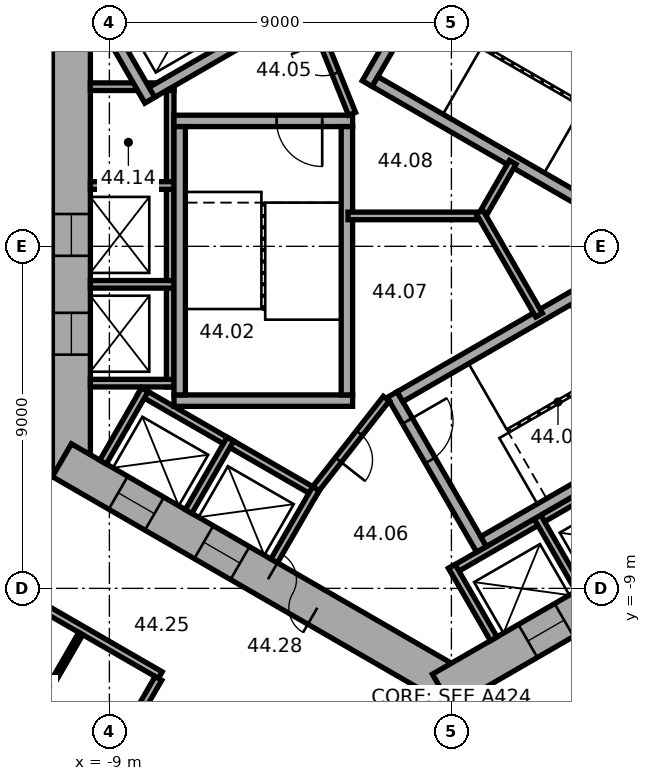
"""IFC4 building model, lengths in metres.
Left out: names, types, materials, properties, quantities, classifications, styles, units other than length and angle.
Written with IfcOpenShell. Run it as: python <this file> out.ifc"""

import sys

from ifc_helpers import new_model, si_unit, direction, frame, frame_2d, origin, place, context, subcontext, project, spatial, rectangle, extrude, element, fill, save


model = new_model("IFC4")
c1 = context("Model", 3, precision=1e-05, world=origin(), true_north=direction((0.0, 1.0)))
c2 = subcontext(c1, "Body", "Model", "MODEL_VIEW")
j1 = project(units=[si_unit("LENGTHUNIT", "METRE"), si_unit("PLANEANGLEUNIT", "RADIAN")], contexts=[c1])
p1 = place(None, origin())
s1 = spatial("IfcSite", under=j1, at=p1, CompositionType="ELEMENT")
p2 = place(p1, origin())
s2 = spatial("IfcBuilding", under=s1, at=p2, CompositionType="ELEMENT")
p3 = place(p2, frame((0.0, 0.0, 179.9)))
s3 = spatial("IfcBuildingStorey", under=s2, at=p3, CompositionType="ELEMENT", Elevation=179.9)
p4 = place(p3, frame((-10.0, 6.062, 0.0), z_axis=(0.0, 0.0, 1.0), x_axis=(0.0, -1.0, 0.0)))
e1 = element("IfcWall", 1, at=p4, inside=s3, PredefinedType="SHEAR", context=c2, shape_type="SweptSolid", body=[
    extrude(rectangle(XDim=12.125, YDim=1.0, at=frame_2d((6.062, 0.0))), origin(), (0.0, 0.0, 1.0), 3.7),
])
p5 = place(p4, frame((5.212, 0.0, 0.0)))
e2 = element("IfcOpeningElement", 2, at=p5, cuts=e1, PredefinedType="OPENING", context=c2, shape_type="SweptSolid", body=[
    extrude(rectangle(XDim=1.1, YDim=2.1, at=frame_2d((0.55, 1.05))), frame((0.0, 0.51, 0.0), z_axis=(0.0, -1.0, 0.0), x_axis=(1.0, 0.0, 0.0)), (0.0, 0.0, 1.0), 1.02),
])
p6 = place(p4, frame((7.812, 0.0, 0.0)))
e3 = element("IfcOpeningElement", 3, at=p6, cuts=e1, PredefinedType="OPENING", context=c2, shape_type="SweptSolid", body=[
    extrude(rectangle(XDim=1.1, YDim=2.1, at=frame_2d((0.55, 1.05))), frame((0.0, 0.51, 0.0), z_axis=(0.0, -1.0, 0.0), x_axis=(1.0, 0.0, 0.0)), (0.0, 0.0, 1.0), 1.02),
])
p7 = place(p3, frame((-10.25, -5.629, 0.0), z_axis=(0.0, 0.0, 1.0), x_axis=(0.866022616891, -0.50000482701, 0.0)))
e4 = element("IfcWall", 4, at=p7, inside=s3, PredefinedType="SHEAR", context=c2, shape_type="SweptSolid", body=[
    extrude(rectangle(XDim=12.125, YDim=1.0, at=frame_2d((6.062, 0.0))), origin(), (0.0, 0.0, 1.0), 3.7),
])
p8 = place(p7, frame((6.262, 0.0, 0.0)))
e5 = element("IfcOpeningElement", 5, at=p8, cuts=e4, PredefinedType="OPENING", context=c2, shape_type="SweptSolid", body=[
    extrude(rectangle(XDim=1.5, YDim=2.1, at=frame_2d((0.75, 1.05))), frame((0.0, 0.51, 0.0), z_axis=(0.0, -1.0, 0.0), x_axis=(1.0, 0.0, 0.0)), (0.0, 0.0, 1.0), 1.02),
])
p9 = place(p7, frame((1.712, 0.0, 0.0)))
e6 = element("IfcOpeningElement", 6, at=p9, cuts=e4, PredefinedType="OPENING", context=c2, shape_type="SweptSolid", body=[
    extrude(rectangle(XDim=1.1, YDim=2.1, at=frame_2d((0.55, 1.05))), frame((0.0, 0.51, 0.0), z_axis=(0.0, -1.0, 0.0), x_axis=(1.0, 0.0, 0.0)), (0.0, 0.0, 1.0), 1.02),
])
p10 = place(p7, frame((4.312, 0.0, 0.0)))
e7 = element("IfcOpeningElement", 7, at=p10, cuts=e4, PredefinedType="OPENING", context=c2, shape_type="SweptSolid", body=[
    extrude(rectangle(XDim=1.1, YDim=2.1, at=frame_2d((0.55, 1.05))), frame((0.0, 0.51, 0.0), z_axis=(0.0, -1.0, 0.0), x_axis=(1.0, 0.0, 0.0)), (0.0, 0.0, 1.0), 1.02),
])
p11 = place(p3, frame((-0.25, -11.691, 0.0), z_axis=(0.0, 0.0, 1.0), x_axis=(0.866022616891, 0.50000482701, 0.0)))
e8 = element("IfcWall", 8, at=p11, inside=s3, PredefinedType="SHEAR", context=c2, shape_type="SweptSolid", body=[
    extrude(rectangle(XDim=12.125, YDim=1.0, at=frame_2d((6.062, 0.0))), origin(), (0.0, 0.0, 1.0), 3.7),
])
p12 = place(p11, frame((2.612, 0.0, 0.0)))
e9 = element("IfcOpeningElement", 9, at=p12, cuts=e8, PredefinedType="OPENING", context=c2, shape_type="SweptSolid", body=[
    extrude(rectangle(XDim=1.1, YDim=2.1, at=frame_2d((0.55, 1.05))), frame((0.0, 0.51, 0.0), z_axis=(0.0, -1.0, 0.0), x_axis=(1.0, 0.0, 0.0)), (0.0, 0.0, 1.0), 1.02),
])
p13 = place(p11, frame((5.212, 0.0, 0.0)))
e10 = element("IfcOpeningElement", 10, at=p13, cuts=e8, PredefinedType="OPENING", context=c2, shape_type="SweptSolid", body=[
    extrude(rectangle(XDim=1.1, YDim=2.1, at=frame_2d((0.55, 1.05))), frame((0.0, 0.51, 0.0), z_axis=(0.0, -1.0, 0.0), x_axis=(1.0, 0.0, 0.0)), (0.0, 0.0, 1.0), 1.02),
])
p14 = place(p11, frame((7.812, 0.0, 0.0)))
e11 = element("IfcOpeningElement", 11, at=p14, cuts=e8, PredefinedType="OPENING", context=c2, shape_type="SweptSolid", body=[
    extrude(rectangle(XDim=1.1, YDim=2.1, at=frame_2d((0.55, 1.05))), frame((0.0, 0.51, 0.0), z_axis=(0.0, -1.0, 0.0), x_axis=(1.0, 0.0, 0.0)), (0.0, 0.0, 1.0), 1.02),
])
for number, where, z_axis, x_axis in (
    (12, (7.424, 4.259, 0.0), (0.0, 0.0, 1.0), (-0.866, 0.5, 0.0)),
    (13, (-7.4, 4.3, 0.0), (0.0, 0.0, 1.0), (0.0, -1.0, 0.0)),
):
    element("IfcWall", number, at=place(p3, frame(where, z_axis=z_axis, x_axis=x_axis)), inside=s3, PredefinedType="PARTITIONING", context=c2, shape_type="SweptSolid", body=[
        extrude(rectangle(XDim=8.0, YDim=0.2, at=frame_2d((4.0, 0.0))), origin(), (0.0, 0.0, 1.0), 3.42),
    ])
for number, where, z_axis, x_axis in (
    (14, (-7.3, 4.2, 0.0), (0.0, 0.0, 1.0), (-1.0, 0.0, 0.0)),
    (15, (-7.3, 1.6, 0.0), (0.0, 0.0, 1.0), (-1.0, 0.0, 0.0)),
    (16, (-7.3, -1.0, 0.0), (0.0, 0.0, 1.0), (-1.0, 0.0, 0.0)),
    (17, (-7.3, -3.6, 0.0), (0.0, 0.0, 1.0), (-1.0, 0.0, 0.0)),
):
    element("IfcWall", number, at=place(p3, frame(where, z_axis=z_axis, x_axis=x_axis)), inside=s3, PredefinedType="PARTITIONING", context=c2, shape_type="SweptSolid", body=[
        extrude(rectangle(XDim=2.2, YDim=0.2, at=frame_2d((1.1, 0.0))), origin(), (0.0, 0.0, 1.0), 3.42),
    ])
p15 = place(p3, frame((-8.203, -3.809, 0.0), z_axis=(0.0, 0.0, 1.0), x_axis=(0.866028230842, -0.499995103361, 0.0)))
e18 = element("IfcWall", 18, at=p15, inside=s3, PredefinedType="PARTITIONING", context=c2, shape_type="SweptSolid", body=[
    extrude(rectangle(XDim=5.4, YDim=0.2, at=frame_2d((2.7, 0.0))), origin(), (0.0, 0.0, 1.0), 3.42),
])
for number, where, z_axis, x_axis in (
    (19, (-8.067, -3.772, 0.0), (0.0, 0.0, 1.0), (-0.5, -0.866, 0.0)),
    (20, (-5.815, -5.072, 0.0), (0.0, 0.0, 1.0), (-0.5, -0.866, 0.0)),
):
    element("IfcWall", number, at=place(p3, frame(where, z_axis=z_axis, x_axis=x_axis)), inside=s3, PredefinedType="PARTITIONING", context=c2, shape_type="SweptSolid", body=[
        extrude(rectangle(XDim=2.2, YDim=0.2, at=frame_2d((1.1, 0.0))), origin(), (0.0, 0.0, 1.0), 3.42),
    ])
p16 = place(p3, frame((-3.563, -6.372, 0.0), z_axis=(0.0, 0.0, 1.0), x_axis=(-0.499994660107, -0.866028486751, 0.0)))
e21 = element("IfcWall", 21, at=p16, inside=s3, PredefinedType="PARTITIONING", context=c2, shape_type="SweptSolid", body=[
    extrude(rectangle(XDim=2.2, YDim=0.2, at=frame_2d((1.1, 0.0))), origin(), (0.0, 0.0, 1.0), 3.42),
])
p17 = place(p3, frame((-0.024, -8.559, 0.0), z_axis=(0.0, 0.0, 1.0), x_axis=(0.866026010844, 0.49999894854, 0.0)))
e22 = element("IfcWall", 22, at=p17, inside=s3, PredefinedType="PARTITIONING", context=c2, shape_type="SweptSolid", body=[
    extrude(rectangle(XDim=8.0, YDim=0.2, at=frame_2d((4.0, 0.0))), origin(), (0.0, 0.0, 1.0), 3.42),
])
for number, where, z_axis, x_axis in (
    (23, (0.013, -8.422, 0.0), (0.0, 0.0, 1.0), (0.5, -0.866, 0.0)),
    (24, (2.264, -7.122, 0.0), (0.0, 0.0, 1.0), (0.5, -0.866, 0.0)),
):
    element("IfcWall", number, at=place(p3, frame(where, z_axis=z_axis, x_axis=x_axis)), inside=s3, PredefinedType="PARTITIONING", context=c2, shape_type="SweptSolid", body=[
        extrude(rectangle(XDim=2.2, YDim=0.2, at=frame_2d((1.1, 0.0))), origin(), (0.0, 0.0, 1.0), 3.42),
    ])
p18 = place(p3, frame((-2.216, 4.282, 0.0), z_axis=(0.0, 0.0, 1.0), x_axis=(0.499977259774, 0.866038532462, 0.0)))
e25 = element("IfcWall", 25, at=p18, inside=s3, PredefinedType="SHEAR", context=c2, shape_type="SweptSolid", body=[
    extrude(rectangle(XDim=4.7, YDim=0.3, at=frame_2d((2.35, 0.0))), origin(), (0.0, 0.0, 1.0), 3.42),
])
for number, where, z_axis, x_axis in (
    (26, (4.103, 0.807, 0.0), (0.0, 0.0, 1.0), (-0.866, 0.5, 0.0)),
    (27, (6.303, 4.617, 0.0), (0.0, 0.0, 1.0), (-0.866, 0.5, 0.0)),
):
    element("IfcWall", number, at=place(p3, frame(where, z_axis=z_axis, x_axis=x_axis)), inside=s3, PredefinedType="SHEAR", context=c2, shape_type="SweptSolid", body=[
        extrude(rectangle(XDim=7.06, YDim=0.3, at=frame_2d((3.53, 0.0))), origin(), (0.0, 0.0, 1.0), 3.42),
    ])
p19 = place(p3, frame((-2.6, 3.3, 0.0), z_axis=(0.0, 0.0, 1.0), x_axis=(-1.0, 0.0, 0.0)))
e28 = element("IfcWall", 28, at=p19, inside=s3, PredefinedType="SHEAR", context=c2, shape_type="SweptSolid", body=[
    extrude(rectangle(XDim=4.7, YDim=0.3, at=frame_2d((2.35, 0.0))), origin(), (0.0, 0.0, 1.0), 3.42),
])
p20 = place(p19, frame((0.8, 0.0, 0.0)))
e29 = element("IfcOpeningElement", 29, at=p20, cuts=e28, PredefinedType="OPENING", context=c2, shape_type="SweptSolid", body=[
    extrude(rectangle(XDim=1.2, YDim=2.1, at=frame_2d((0.6, 1.05))), frame((0.0, 0.16, 0.0), z_axis=(0.0, -1.0, 0.0), x_axis=(1.0, 0.0, 0.0)), (0.0, 0.0, 1.0), 0.32),
])
p21 = place(p3, frame((-2.6, -4.06, 0.0), z_axis=(0.0, 0.0, 1.0), x_axis=(-1.0, 0.0, 0.0)))
e30 = element("IfcWall", 30, at=p21, inside=s3, PredefinedType="SHEAR", context=c2, shape_type="SweptSolid", body=[
    extrude(rectangle(XDim=4.7, YDim=0.3, at=frame_2d((2.35, 0.0))), origin(), (0.0, 0.0, 1.0), 3.42),
])
for number, where, z_axis, x_axis in (
    (31, (-2.75, 3.15, 0.0), (0.0, 0.0, 1.0), (0.0, -1.0, 0.0)),
    (32, (-7.15, 3.15, 0.0), (0.0, 0.0, 1.0), (0.0, -1.0, 0.0)),
):
    element("IfcWall", number, at=place(p3, frame(where, z_axis=z_axis, x_axis=x_axis)), inside=s3, PredefinedType="SHEAR", context=c2, shape_type="SweptSolid", body=[
        extrude(rectangle(XDim=7.06, YDim=0.3, at=frame_2d((3.53, 0.0))), origin(), (0.0, 0.0, 1.0), 3.42),
    ])
p22 = place(p3, frame((-1.558, -3.902, 0.0), z_axis=(0.0, 0.0, 1.0), x_axis=(0.499977259774, -0.866038532462, 0.0)))
e33 = element("IfcWall", 33, at=p22, inside=s3, PredefinedType="SHEAR", context=c2, shape_type="SweptSolid", body=[
    extrude(rectangle(XDim=4.7, YDim=0.3, at=frame_2d((2.35, 0.0))), origin(), (0.0, 0.0, 1.0), 3.42),
])
p23 = place(p22, frame((0.8, 0.0, 0.0)))
e34 = element("IfcOpeningElement", 34, at=p23, cuts=e33, PredefinedType="OPENING", context=c2, shape_type="SweptSolid", body=[
    extrude(rectangle(XDim=1.2, YDim=2.1, at=frame_2d((0.6, 1.05))), frame((0.0, 0.16, 0.0), z_axis=(0.0, -1.0, 0.0), x_axis=(1.0, 0.0, 0.0)), (0.0, 0.0, 1.0), 0.32),
])
for number, where, z_axis, x_axis in (
    (35, (-1.353, -3.957, 0.0), (0.0, 0.0, 1.0), (0.866, 0.5, 0.0)),
    (36, (0.847, -7.767, 0.0), (0.0, 0.0, 1.0), (0.866, 0.5, 0.0)),
):
    element("IfcWall", number, at=place(p3, frame(where, z_axis=z_axis, x_axis=x_axis)), inside=s3, PredefinedType="SHEAR", context=c2, shape_type="SweptSolid", body=[
        extrude(rectangle(XDim=7.06, YDim=0.3, at=frame_2d((3.53, 0.0))), origin(), (0.0, 0.0, 1.0), 3.42),
    ])
p24 = place(p3, frame((-5.24, 5.577, 0.0), z_axis=(0.0, 0.0, 1.0), x_axis=(-0.866014461049, -0.500018952895, 0.0)))
e37 = element("IfcWall", 37, at=p24, inside=s3, PredefinedType="SHEAR", context=c2, shape_type="SweptSolid", body=[
    extrude(rectangle(XDim=3.35, YDim=0.3, at=frame_2d((1.675, 0.0))), origin(), (0.0, 0.0, 1.0), 3.42),
])
p25 = place(p3, frame((-7.937, 3.847, 0.0), z_axis=(0.0, 0.0, 1.0), x_axis=(-0.50002983664, 0.866008176907, 0.0)))
e38 = element("IfcWall", 38, at=p25, inside=s3, PredefinedType="SHEAR", context=c2, shape_type="SweptSolid", body=[
    extrude(rectangle(XDim=2.2, YDim=0.3, at=frame_2d((1.1, 0.0))), origin(), (0.0, 0.0, 1.0), 3.42),
])
p26 = place(p3, frame((-2.615, 3.487, 0.0), z_axis=(0.0, 0.0, 1.0), x_axis=(-0.373576831041, 0.92759924068, 0.0)))
e39 = element("IfcWall", 39, at=p26, inside=s3, PredefinedType="PARTITIONING", context=c2, shape_type="SweptSolid", body=[
    extrude(rectangle(XDim=3.002, YDim=0.2, at=frame_2d((1.501, 0.0))), origin(), (0.0, 0.0, 1.0), 3.42),
])
p27 = place(p26, frame((1.15, 0.0, 0.0)))
e40 = element("IfcOpeningElement", 40, at=p27, cuts=e39, PredefinedType="OPENING", context=c2, shape_type="SweptSolid", body=[
    extrude(rectangle(XDim=0.9, YDim=2.1, at=frame_2d((0.45, 1.05))), frame((0.0, 0.11, 0.0), z_axis=(0.0, -1.0, 0.0), x_axis=(1.0, 0.0, 0.0)), (0.0, 0.0, 1.0), 0.22),
])
p28 = place(p3, frame((-1.712, -4.008, 0.0), z_axis=(0.0, 0.0, 1.0), x_axis=(-0.616549420702, -0.787316208287, 0.0)))
e41 = element("IfcWall", 41, at=p28, inside=s3, PredefinedType="PARTITIONING", context=c2, shape_type="SweptSolid", body=[
    extrude(rectangle(XDim=3.002, YDim=0.2, at=frame_2d((1.501, 0.0))), origin(), (0.0, 0.0, 1.0), 3.42),
])
p29 = place(p28, frame((1.15, 0.0, 0.0)))
e42 = element("IfcOpeningElement", 42, at=p29, cuts=e41, PredefinedType="OPENING", context=c2, shape_type="SweptSolid", body=[
    extrude(rectangle(XDim=0.9, YDim=2.1, at=frame_2d((0.45, 1.05))), frame((0.0, 0.11, 0.0), z_axis=(0.0, -1.0, 0.0), x_axis=(1.0, 0.0, 0.0)), (0.0, 0.0, 1.0), 0.22),
])
p30 = place(p3, frame((0.92, 0.8, 0.0), z_axis=(0.0, 0.0, 1.0), x_axis=(-1.0, 0.0, 0.0)))
e43 = element("IfcWall", 43, at=p30, inside=s3, PredefinedType="PARTITIONING", context=c2, shape_type="SweptSolid", body=[
    extrude(rectangle(XDim=3.64, YDim=0.2, at=frame_2d((1.82, 0.0))), origin(), (0.0, 0.0, 1.0), 3.42),
])
p31 = place(p3, frame((0.74, 0.696, 0.0), z_axis=(0.0, 0.0, 1.0), x_axis=(0.499956301907, 0.86605063142, 0.0)))
e44 = element("IfcWall", 44, at=p31, inside=s3, PredefinedType="PARTITIONING", context=c2, shape_type="SweptSolid", body=[
    extrude(rectangle(XDim=1.747, YDim=0.2, at=frame_2d((0.874, 0.0))), origin(), (0.0, 0.0, 1.0), 3.42),
])
p32 = place(p3, frame((0.74, 0.904, 0.0), z_axis=(0.0, 0.0, 1.0), x_axis=(0.500028278809, -0.866009076391, 0.0)))
e45 = element("IfcWall", 45, at=p32, inside=s3, PredefinedType="PARTITIONING", context=c2, shape_type="SweptSolid", body=[
    extrude(rectangle(XDim=3.133, YDim=0.2, at=frame_2d((1.566, 0.0))), origin(), (0.0, 0.0, 1.0), 3.42),
])
p33 = place(p3, frame((-11.435, -9.103, 0.0), z_axis=(0.0, 0.0, 1.0), x_axis=(0.866007399799, -0.500031182522, 0.0)))
e46 = element("IfcWall", 46, at=p33, inside=s3, PredefinedType="PARTITIONING", context=c2, shape_type="SweptSolid", body=[
    extrude(rectangle(XDim=4.358, YDim=0.2, at=frame_2d((2.179, 0.0))), origin(), (0.0, 0.0, 1.0), 3.42),
])
p34 = place(p3, frame((-11.235, -17.474, 0.0), z_axis=(0.0, 0.0, 1.0), x_axis=(0.500009260695, 0.866020057054, 0.0)))
e47 = element("IfcWall", 47, at=p34, inside=s3, PredefinedType="PARTITIONING", context=c2, shape_type="SweptSolid", body=[
    extrude(rectangle(XDim=7.049, YDim=0.2, at=frame_2d((3.524, 0.0))), origin(), (0.0, 0.0, 1.0), 2.87),
])
p35 = place(p34, frame((3.024, 0.0, 0.0)))
e48 = element("IfcOpeningElement", 48, at=p35, cuts=e47, PredefinedType="OPENING", context=c2, shape_type="SweptSolid", body=[
    extrude(rectangle(XDim=1.0, YDim=2.1, at=frame_2d((0.5, 1.05))), frame((0.0, 0.11, 0.0), z_axis=(0.0, -1.0, 0.0), x_axis=(1.0, 0.0, 0.0)), (0.0, 0.0, 1.0), 0.22),
])
p36 = place(p3, frame((-9.753, -10.19, 0.0), z_axis=(0.0, 0.0, 1.0), x_axis=(-0.49994888933, -0.866054910533, 0.0)))
e49 = element("IfcWall", 49, at=p36, inside=s3, PredefinedType="PARTITIONING", context=c2, shape_type="SweptSolid", body=[
    extrude(rectangle(XDim=2.24, YDim=0.12, at=frame_2d((1.12, 0.0))), origin(), (0.0, 0.0, 1.0), 3.42),
])
p37 = place(p8, origin())
e50 = element("IfcDoor", 50, at=p37, inside=s3, OperationType="DOUBLE_DOOR_SINGLE_SWING", PredefinedType="DOOR", context=c2, shape_type="SweptSolid", body=[
    extrude(rectangle(XDim=1.5, YDim=2.1, at=frame_2d((0.75, 1.05))), frame((0.0, 0.025, 0.0), z_axis=(0.0, -1.0, 0.0), x_axis=(1.0, 0.0, 0.0)), (0.0, 0.0, 1.0), 0.05),
])
fill(e5, e50)
p38 = place(p20, origin())
e51 = element("IfcDoor", 51, at=p38, inside=s3, OperationType="SINGLE_SWING_RIGHT", PredefinedType="DOOR", context=c2, shape_type="SweptSolid", body=[
    extrude(rectangle(XDim=1.2, YDim=2.1, at=frame_2d((0.6, 1.05))), frame((0.0, 0.025, 0.0), z_axis=(0.0, -1.0, 0.0), x_axis=(1.0, 0.0, 0.0)), (0.0, 0.0, 1.0), 0.05),
])
fill(e29, e51)
p39 = place(p23, origin())
e52 = element("IfcDoor", 52, at=p39, inside=s3, OperationType="SINGLE_SWING_RIGHT", PredefinedType="DOOR", context=c2, shape_type="SweptSolid", body=[
    extrude(rectangle(XDim=1.2, YDim=2.1, at=frame_2d((0.6, 1.05))), frame((0.0, 0.025, 0.0), z_axis=(0.0, -1.0, 0.0), x_axis=(1.0, 0.0, 0.0)), (0.0, 0.0, 1.0), 0.05),
])
fill(e34, e52)
p40 = place(p27, origin())
e53 = element("IfcDoor", 53, at=p40, inside=s3, OperationType="SINGLE_SWING_LEFT", PredefinedType="DOOR", context=c2, shape_type="SweptSolid", body=[
    extrude(rectangle(XDim=0.9, YDim=2.1, at=frame_2d((0.45, 1.05))), frame((0.0, 0.025, 0.0), z_axis=(0.0, -1.0, 0.0), x_axis=(1.0, 0.0, 0.0)), (0.0, 0.0, 1.0), 0.05),
])
fill(e40, e53)
p41 = place(p29, origin())
e54 = element("IfcDoor", 54, at=p41, inside=s3, OperationType="SINGLE_SWING_LEFT", PredefinedType="DOOR", context=c2, shape_type="SweptSolid", body=[
    extrude(rectangle(XDim=0.9, YDim=2.1, at=frame_2d((0.45, 1.05))), frame((0.0, 0.025, 0.0), z_axis=(0.0, -1.0, 0.0), x_axis=(1.0, 0.0, 0.0)), (0.0, 0.0, 1.0), 0.05),
])
fill(e42, e54)
p42 = place(p5, origin())
e55 = element("IfcDoor", 55, at=p42, inside=s3, OperationType="DOUBLE_DOOR_SLIDING", PredefinedType="DOOR", context=c2, shape_type="SweptSolid", body=[
    extrude(rectangle(XDim=1.1, YDim=2.1, at=frame_2d((0.55, 1.05))), frame((0.0, 0.025, 0.0), z_axis=(0.0, -1.0, 0.0), x_axis=(1.0, 0.0, 0.0)), (0.0, 0.0, 1.0), 0.05),
])
fill(e2, e55)
p43 = place(p6, origin())
e56 = element("IfcDoor", 56, at=p43, inside=s3, OperationType="DOUBLE_DOOR_SLIDING", PredefinedType="DOOR", context=c2, shape_type="SweptSolid", body=[
    extrude(rectangle(XDim=1.1, YDim=2.1, at=frame_2d((0.55, 1.05))), frame((0.0, 0.025, 0.0), z_axis=(0.0, -1.0, 0.0), x_axis=(1.0, 0.0, 0.0)), (0.0, 0.0, 1.0), 0.05),
])
fill(e3, e56)
p44 = place(p9, origin())
e57 = element("IfcDoor", 57, at=p44, inside=s3, OperationType="DOUBLE_DOOR_SLIDING", PredefinedType="DOOR", context=c2, shape_type="SweptSolid", body=[
    extrude(rectangle(XDim=1.1, YDim=2.1, at=frame_2d((0.55, 1.05))), frame((0.0, 0.025, 0.0), z_axis=(0.0, -1.0, 0.0), x_axis=(1.0, 0.0, 0.0)), (0.0, 0.0, 1.0), 0.05),
])
fill(e6, e57)
p45 = place(p10, origin())
e58 = element("IfcDoor", 58, at=p45, inside=s3, OperationType="DOUBLE_DOOR_SLIDING", PredefinedType="DOOR", context=c2, shape_type="SweptSolid", body=[
    extrude(rectangle(XDim=1.1, YDim=2.1, at=frame_2d((0.55, 1.05))), frame((0.0, 0.025, 0.0), z_axis=(0.0, -1.0, 0.0), x_axis=(1.0, 0.0, 0.0)), (0.0, 0.0, 1.0), 0.05),
])
fill(e7, e58)
p46 = place(p12, origin())
e59 = element("IfcDoor", 59, at=p46, inside=s3, OperationType="DOUBLE_DOOR_SLIDING", PredefinedType="DOOR", context=c2, shape_type="SweptSolid", body=[
    extrude(rectangle(XDim=1.1, YDim=2.1, at=frame_2d((0.55, 1.05))), frame((0.0, 0.025, 0.0), z_axis=(0.0, -1.0, 0.0), x_axis=(1.0, 0.0, 0.0)), (0.0, 0.0, 1.0), 0.05),
])
fill(e9, e59)
save(model, sys.argv[1])
